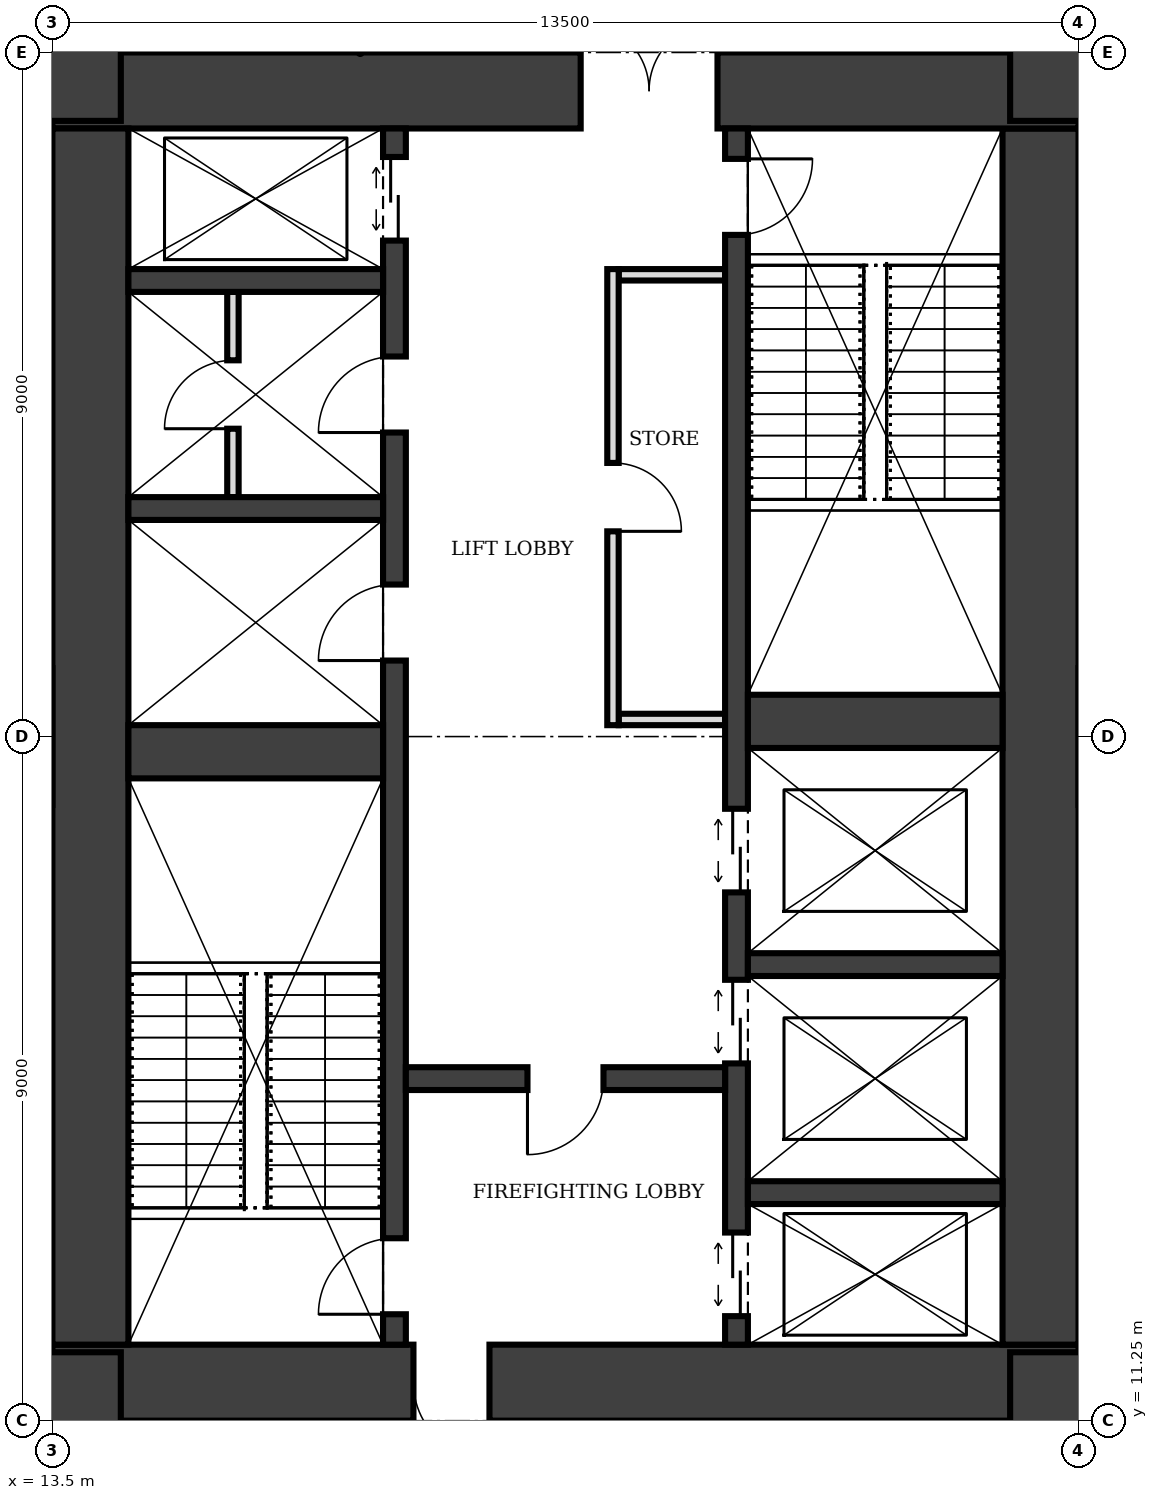
"""IFC4 building model, lengths in metres.
Left out: names, types, materials, properties, quantities, classifications, styles, units other than length and angle.
Written with IfcOpenShell. Run it as: python <this file> out.ifc"""

import sys

from ifc_helpers import new_model, si_unit, direction, frame, frame_2d, origin, place, context, subcontext, project, spatial, rectangle, extrude, element, fill, save


model = new_model("IFC4")
c1 = context("Model", 3, precision=1e-05, world=origin(), true_north=direction((0.0, 1.0)))
c2 = subcontext(c1, "Body", "Model", "MODEL_VIEW")
j1 = project(units=[si_unit("LENGTHUNIT", "METRE"), si_unit("PLANEANGLEUNIT", "RADIAN")], contexts=[c1])
p1 = place(None, origin())
s1 = spatial("IfcSite", under=j1, at=p1, CompositionType="ELEMENT")
p2 = place(p1, origin())
s2 = spatial("IfcBuilding", under=s1, at=p2, CompositionType="ELEMENT")
p3 = place(p2, frame((0.0, 0.0, 169.0)))
s3 = spatial("IfcBuildingStorey", under=s2, at=p3, CompositionType="ELEMENT", Elevation=169.0)
p4 = place(p3, frame((13.5, 11.75, 0.0), z_axis=(0.0, 0.0, 1.0), x_axis=(1.0, 0.0, 0.0)))
e1 = element("IfcWall", 1, at=p4, inside=s3, PredefinedType="SHEAR", context=c2, shape_type="SweptSolid", body=[
    extrude(rectangle(XDim=13.5, YDim=1.0, at=frame_2d((6.75, 0.0))), origin(), (0.0, 0.0, 1.0), 8.0),
])
p5 = place(p4, frame((4.75, 0.0, 0.0)))
e2 = element("IfcOpeningElement", 2, at=p5, cuts=e1, PredefinedType="OPENING", context=c2, shape_type="SweptSolid", body=[
    extrude(rectangle(XDim=1.0, YDim=2.1, at=frame_2d((0.5, 1.05))), frame((0.0, 0.51, 0.0), z_axis=(0.0, -1.0, 0.0), x_axis=(1.0, 0.0, 0.0)), (0.0, 0.0, 1.0), 1.02),
])
p6 = place(p3, frame((26.5, 12.25, 0.0), z_axis=(0.0, 0.0, 1.0), x_axis=(0.0, 1.0, 0.0)))
e3 = element("IfcWall", 3, at=p6, inside=s3, PredefinedType="SHEAR", context=c2, shape_type="SweptSolid", body=[
    extrude(rectangle(XDim=16.0, YDim=1.0, at=frame_2d((8.0, 0.0))), origin(), (0.0, 0.0, 1.0), 8.0),
])
p7 = place(p3, frame((27.0, 28.75, 0.0), z_axis=(0.0, 0.0, 1.0), x_axis=(-1.0, 0.0, 0.0)))
e4 = element("IfcWall", 4, at=p7, inside=s3, PredefinedType="SHEAR", context=c2, shape_type="SweptSolid", body=[
    extrude(rectangle(XDim=13.5, YDim=1.0, at=frame_2d((6.75, 0.0))), origin(), (0.0, 0.0, 1.0), 8.0),
])
p8 = place(p7, frame((4.75, 0.0, 0.0)))
e5 = element("IfcOpeningElement", 5, at=p8, cuts=e4, PredefinedType="OPENING", context=c2, shape_type="SweptSolid", body=[
    extrude(rectangle(XDim=1.8, YDim=2.1, at=frame_2d((0.9, 1.05))), frame((0.0, 0.51, 0.0), z_axis=(0.0, -1.0, 0.0), x_axis=(1.0, 0.0, 0.0)), (0.0, 0.0, 1.0), 1.02),
])
p9 = place(p3, frame((14.0, 28.25, 0.0), z_axis=(0.0, 0.0, 1.0), x_axis=(0.0, -1.0, 0.0)))
e6 = element("IfcWall", 6, at=p9, inside=s3, PredefinedType="SHEAR", context=c2, shape_type="SweptSolid", body=[
    extrude(rectangle(XDim=16.0, YDim=1.0, at=frame_2d((8.0, 0.0))), origin(), (0.0, 0.0, 1.0), 8.0),
])
p10 = place(p3, frame((18.0, 12.25, 0.0), z_axis=(0.0, 0.0, 1.0), x_axis=(0.0, 1.0, 0.0)))
e7 = element("IfcWall", 7, at=p10, inside=s3, PredefinedType="SHEAR", context=c2, shape_type="SweptSolid", body=[
    extrude(rectangle(XDim=16.0, YDim=0.3, at=frame_2d((8.0, 0.0))), origin(), (0.0, 0.0, 1.0), 8.0),
])
p11 = place(p10, frame((0.4, 0.0, 0.0)))
e8 = element("IfcOpeningElement", 8, at=p11, cuts=e7, PredefinedType="OPENING", context=c2, shape_type="SweptSolid", body=[
    extrude(rectangle(XDim=1.0, YDim=2.1, at=frame_2d((0.5, 1.05))), frame((0.0, 0.16, 0.0), z_axis=(0.0, -1.0, 0.0), x_axis=(1.0, 0.0, 0.0)), (0.0, 0.0, 1.0), 0.32),
])
p12 = place(p10, frame((14.525, 0.0, 0.0)))
e9 = element("IfcOpeningElement", 9, at=p12, cuts=e7, PredefinedType="OPENING", context=c2, shape_type="SweptSolid", body=[
    extrude(rectangle(XDim=1.1, YDim=2.1, at=frame_2d((0.55, 1.05))), frame((0.0, 0.16, 0.0), z_axis=(0.0, -1.0, 0.0), x_axis=(1.0, 0.0, 0.0)), (0.0, 0.0, 1.0), 0.32),
])
p13 = place(p10, frame((9.0, 0.0, 0.0)))
e10 = element("IfcOpeningElement", 10, at=p13, cuts=e7, PredefinedType="OPENING", context=c2, shape_type="SweptSolid", body=[
    extrude(rectangle(XDim=1.0, YDim=2.1, at=frame_2d((0.5, 1.05))), frame((0.0, 0.16, 0.0), z_axis=(0.0, -1.0, 0.0), x_axis=(1.0, 0.0, 0.0)), (0.0, 0.0, 1.0), 0.32),
])
p14 = place(p10, frame((12.0, 0.0, 0.0)))
e11 = element("IfcOpeningElement", 11, at=p14, cuts=e7, PredefinedType="OPENING", context=c2, shape_type="SweptSolid", body=[
    extrude(rectangle(XDim=1.0, YDim=2.1, at=frame_2d((0.5, 1.05))), frame((0.0, 0.16, 0.0), z_axis=(0.0, -1.0, 0.0), x_axis=(1.0, 0.0, 0.0)), (0.0, 0.0, 1.0), 0.32),
])
p15 = place(p3, frame((22.5, 12.25, 0.0), z_axis=(0.0, 0.0, 1.0), x_axis=(0.0, 1.0, 0.0)))
e12 = element("IfcWall", 12, at=p15, inside=s3, PredefinedType="SHEAR", context=c2, shape_type="SweptSolid", body=[
    extrude(rectangle(XDim=16.0, YDim=0.3, at=frame_2d((8.0, 0.0))), origin(), (0.0, 0.0, 1.0), 8.0),
])
p16 = place(p15, frame((14.6, 0.0, 0.0)))
e13 = element("IfcOpeningElement", 13, at=p16, cuts=e12, PredefinedType="OPENING", context=c2, shape_type="SweptSolid", body=[
    extrude(rectangle(XDim=1.0, YDim=2.1, at=frame_2d((0.5, 1.05))), frame((0.0, 0.16, 0.0), z_axis=(0.0, -1.0, 0.0), x_axis=(1.0, 0.0, 0.0)), (0.0, 0.0, 1.0), 0.32),
])
p17 = place(p15, frame((0.375, 0.0, 0.0)))
e14 = element("IfcOpeningElement", 14, at=p17, cuts=e12, PredefinedType="OPENING", context=c2, shape_type="SweptSolid", body=[
    extrude(rectangle(XDim=1.1, YDim=2.1, at=frame_2d((0.55, 1.05))), frame((0.0, 0.16, 0.0), z_axis=(0.0, -1.0, 0.0), x_axis=(1.0, 0.0, 0.0)), (0.0, 0.0, 1.0), 0.32),
])
p18 = place(p15, frame((3.7, 0.0, 0.0)))
e15 = element("IfcOpeningElement", 15, at=p18, cuts=e12, PredefinedType="OPENING", context=c2, shape_type="SweptSolid", body=[
    extrude(rectangle(XDim=1.1, YDim=2.1, at=frame_2d((0.55, 1.05))), frame((0.0, 0.16, 0.0), z_axis=(0.0, -1.0, 0.0), x_axis=(1.0, 0.0, 0.0)), (0.0, 0.0, 1.0), 0.32),
])
p19 = place(p15, frame((5.95, 0.0, 0.0)))
e16 = element("IfcOpeningElement", 16, at=p19, cuts=e12, PredefinedType="OPENING", context=c2, shape_type="SweptSolid", body=[
    extrude(rectangle(XDim=1.1, YDim=2.1, at=frame_2d((0.55, 1.05))), frame((0.0, 0.16, 0.0), z_axis=(0.0, -1.0, 0.0), x_axis=(1.0, 0.0, 0.0)), (0.0, 0.0, 1.0), 0.32),
])
p20 = place(p3, frame((14.5, 20.05, 0.0), z_axis=(0.0, 0.0, 1.0), x_axis=(1.0, 0.0, 0.0)))
e17 = element("IfcWall", 17, at=p20, inside=s3, PredefinedType="SHEAR", context=c2, shape_type="SweptSolid", body=[
    extrude(rectangle(XDim=3.35, YDim=0.7, at=frame_2d((1.675, 0.0))), origin(), (0.0, 0.0, 1.0), 8.0),
])
p21 = place(p3, frame((18.15, 15.75, 0.0), z_axis=(0.0, 0.0, 1.0), x_axis=(1.0, 0.0, 0.0)))
e18 = element("IfcWall", 18, at=p21, inside=s3, PredefinedType="SHEAR", context=c2, shape_type="SweptSolid", body=[
    extrude(rectangle(XDim=4.2, YDim=0.3, at=frame_2d((2.1, 0.0))), origin(), (0.0, 0.0, 1.0), 8.0),
])
p22 = place(p21, frame((1.6, 0.0, 0.0)))
e19 = element("IfcOpeningElement", 19, at=p22, cuts=e18, PredefinedType="OPENING", context=c2, shape_type="SweptSolid", body=[
    extrude(rectangle(XDim=1.0, YDim=2.1, at=frame_2d((0.5, 1.05))), frame((0.0, 0.16, 0.0), z_axis=(0.0, -1.0, 0.0), x_axis=(1.0, 0.0, 0.0)), (0.0, 0.0, 1.0), 0.32),
])
for number, where, z_axis, x_axis in (
    (20, (22.65, 14.25, 0.0), (0.0, 0.0, 1.0), (1.0, 0.0, 0.0)),
    (21, (22.65, 17.25, 0.0), (0.0, 0.0, 1.0), (1.0, 0.0, 0.0)),
):
    element("IfcWall", number, at=place(p3, frame(where, z_axis=z_axis, x_axis=x_axis)), inside=s3, PredefinedType="SHEAR", context=c2, shape_type="SweptSolid", body=[
        extrude(rectangle(XDim=3.35, YDim=0.3, at=frame_2d((1.675, 0.0))), origin(), (0.0, 0.0, 1.0), 8.0),
    ])
p23 = place(p3, frame((22.65, 20.45, 0.0), z_axis=(0.0, 0.0, 1.0), x_axis=(1.0, 0.0, 0.0)))
e22 = element("IfcWall", 22, at=p23, inside=s3, PredefinedType="SHEAR", context=c2, shape_type="SweptSolid", body=[
    extrude(rectangle(XDim=3.35, YDim=0.7, at=frame_2d((1.675, 0.0))), origin(), (0.0, 0.0, 1.0), 8.0),
])
for number, where, z_axis, x_axis in (
    (23, (14.5, 23.25, 0.0), (0.0, 0.0, 1.0), (1.0, 0.0, 0.0)),
    (24, (14.5, 26.25, 0.0), (0.0, 0.0, 1.0), (1.0, 0.0, 0.0)),
):
    element("IfcWall", number, at=place(p3, frame(where, z_axis=z_axis, x_axis=x_axis)), inside=s3, PredefinedType="SHEAR", context=c2, shape_type="SweptSolid", body=[
        extrude(rectangle(XDim=3.35, YDim=0.3, at=frame_2d((1.675, 0.0))), origin(), (0.0, 0.0, 1.0), 8.0),
    ])
p24 = place(p3, frame((13.5, 4.5, 0.0), z_axis=(0.0, 0.0, 1.0), x_axis=(0.0, 1.0, 0.0)))
e25 = element("IfcWall", 25, at=p24, inside=s3, PredefinedType="SHEAR", context=c2, shape_type="SweptSolid", body=[
    extrude(rectangle(XDim=7.65, YDim=1.8, at=frame_2d((3.825, 0.0))), origin(), (0.0, 0.0, 1.0), 8.0),
])
p25 = place(p24, frame((2.775, 0.0, 0.0)))
e26 = element("IfcOpeningElement", 26, at=p25, cuts=e25, PredefinedType="OPENING", context=c2, shape_type="SweptSolid", body=[
    extrude(rectangle(XDim=1.2, YDim=2.1, at=frame_2d((0.6, 1.05))), frame((0.0, 0.91, 0.0), z_axis=(0.0, -1.0, 0.0), x_axis=(1.0, 0.0, 0.0)), (0.0, 0.0, 1.0), 1.82),
])
p26 = place(p3, frame((27.0, 4.5, 0.0), z_axis=(0.0, 0.0, 1.0), x_axis=(0.0, 1.0, 0.0)))
e27 = element("IfcWall", 27, at=p26, inside=s3, PredefinedType="SHEAR", context=c2, shape_type="SweptSolid", body=[
    extrude(rectangle(XDim=7.65, YDim=1.8, at=frame_2d((3.825, 0.0))), origin(), (0.0, 0.0, 1.0), 8.0),
])
p27 = place(p26, frame((2.775, 0.0, 0.0)))
e28 = element("IfcOpeningElement", 28, at=p27, cuts=e27, PredefinedType="OPENING", context=c2, shape_type="SweptSolid", body=[
    extrude(rectangle(XDim=1.2, YDim=2.1, at=frame_2d((0.6, 1.05))), frame((0.0, 0.91, 0.0), z_axis=(0.0, -1.0, 0.0), x_axis=(1.0, 0.0, 0.0)), (0.0, 0.0, 1.0), 1.82),
])
p28 = place(p3, frame((13.5, 28.35, 0.0), z_axis=(0.0, 0.0, 1.0), x_axis=(0.0, 1.0, 0.0)))
e29 = element("IfcWall", 29, at=p28, inside=s3, PredefinedType="SHEAR", context=c2, shape_type="SweptSolid", body=[
    extrude(rectangle(XDim=7.65, YDim=1.8, at=frame_2d((3.825, 0.0))), origin(), (0.0, 0.0, 1.0), 8.0),
])
p29 = place(p28, frame((3.675, 0.0, 0.0)))
e30 = element("IfcOpeningElement", 30, at=p29, cuts=e29, PredefinedType="OPENING", context=c2, shape_type="SweptSolid", body=[
    extrude(rectangle(XDim=1.2, YDim=2.1, at=frame_2d((0.6, 1.05))), frame((0.0, 0.91, 0.0), z_axis=(0.0, -1.0, 0.0), x_axis=(1.0, 0.0, 0.0)), (0.0, 0.0, 1.0), 1.82),
])
p30 = place(p3, frame((27.0, 28.35, 0.0), z_axis=(0.0, 0.0, 1.0), x_axis=(0.0, 1.0, 0.0)))
e31 = element("IfcWall", 31, at=p30, inside=s3, PredefinedType="SHEAR", context=c2, shape_type="SweptSolid", body=[
    extrude(rectangle(XDim=7.65, YDim=1.8, at=frame_2d((3.825, 0.0))), origin(), (0.0, 0.0, 1.0), 8.0),
])
p31 = place(p30, frame((3.675, 0.0, 0.0)))
e32 = element("IfcOpeningElement", 32, at=p31, cuts=e31, PredefinedType="OPENING", context=c2, shape_type="SweptSolid", body=[
    extrude(rectangle(XDim=1.2, YDim=2.1, at=frame_2d((0.6, 1.05))), frame((0.0, 0.91, 0.0), z_axis=(0.0, -1.0, 0.0), x_axis=(1.0, 0.0, 0.0)), (0.0, 0.0, 1.0), 1.82),
])
p32 = place(p3, frame((20.875, 20.4, 0.0), z_axis=(0.0, 0.0, 1.0), x_axis=(0.0, 1.0, 0.0)))
e33 = element("IfcWall", 33, at=p32, inside=s3, PredefinedType="PARTITIONING", context=c2, shape_type="SweptSolid", body=[
    extrude(rectangle(XDim=6.0, YDim=0.15, at=frame_2d((3.0, 0.0))), origin(), (0.0, 0.0, 1.0), 7.75),
])
p33 = place(p32, frame((2.55, 0.0, 0.0)))
e34 = element("IfcOpeningElement", 34, at=p33, cuts=e33, PredefinedType="OPENING", context=c2, shape_type="SweptSolid", body=[
    extrude(rectangle(XDim=0.9, YDim=2.1, at=frame_2d((0.45, 1.05))), frame((0.0, 0.085, 0.0), z_axis=(0.0, -1.0, 0.0), x_axis=(1.0, 0.0, 0.0)), (0.0, 0.0, 1.0), 0.17),
])
for number, where, z_axis, x_axis in (
    (35, (20.95, 20.475, 0.0), (0.0, 0.0, 1.0), (1.0, 0.0, 0.0)),
    (36, (20.95, 26.325, 0.0), (0.0, 0.0, 1.0), (1.0, 0.0, 0.0)),
):
    element("IfcWall", number, at=place(p3, frame(where, z_axis=z_axis, x_axis=x_axis)), inside=s3, PredefinedType="PARTITIONING", context=c2, shape_type="SweptSolid", body=[
        extrude(rectangle(XDim=1.4, YDim=0.15, at=frame_2d((0.7, 0.0))), origin(), (0.0, 0.0, 1.0), 7.75),
    ])
p34 = place(p3, frame((15.875, 23.4, 0.0), z_axis=(0.0, 0.0, 1.0), x_axis=(0.0, 1.0, 0.0)))
e37 = element("IfcWall", 37, at=p34, inside=s3, PredefinedType="PARTITIONING", context=c2, shape_type="SweptSolid", body=[
    extrude(rectangle(XDim=2.7, YDim=0.15, at=frame_2d((1.35, 0.0))), origin(), (0.0, 0.0, 1.0), 7.75),
])
p35 = place(p34, frame((0.9, 0.0, 0.0)))
e38 = element("IfcOpeningElement", 38, at=p35, cuts=e37, PredefinedType="OPENING", context=c2, shape_type="SweptSolid", body=[
    extrude(rectangle(XDim=0.9, YDim=2.1, at=frame_2d((0.45, 1.05))), frame((0.0, 0.085, 0.0), z_axis=(0.0, -1.0, 0.0), x_axis=(1.0, 0.0, 0.0)), (0.0, 0.0, 1.0), 0.17),
])
p36 = place(p5, frame((1.0, 0.0, 0.0), z_axis=(0.0, 0.0, 1.0), x_axis=(-1.0, 0.0, 0.0)))
e39 = element("IfcDoor", 39, at=p36, inside=s3, OperationType="SINGLE_SWING_LEFT", PredefinedType="DOOR", context=c2, shape_type="SweptSolid", body=[
    extrude(rectangle(XDim=1.0, YDim=2.1, at=frame_2d((0.5, 1.05))), frame((0.0, 0.025, 0.0), z_axis=(0.0, -1.0, 0.0), x_axis=(1.0, 0.0, 0.0)), (0.0, 0.0, 1.0), 0.05),
])
fill(e2, e39)
p37 = place(p8, frame((1.8, 0.0, 0.0), z_axis=(0.0, 0.0, 1.0), x_axis=(-1.0, 0.0, 0.0)))
e40 = element("IfcDoor", 40, at=p37, inside=s3, OperationType="DOUBLE_DOOR_SINGLE_SWING", PredefinedType="DOOR", context=c2, shape_type="SweptSolid", body=[
    extrude(rectangle(XDim=1.8, YDim=2.1, at=frame_2d((0.9, 1.05))), frame((0.0, 0.025, 0.0), z_axis=(0.0, -1.0, 0.0), x_axis=(1.0, 0.0, 0.0)), (0.0, 0.0, 1.0), 0.05),
])
fill(e5, e40)
p38 = place(p22, frame((1.0, 0.0, 0.0), z_axis=(0.0, 0.0, 1.0), x_axis=(-1.0, 0.0, 0.0)))
e41 = element("IfcDoor", 41, at=p38, inside=s3, OperationType="SINGLE_SWING_RIGHT", PredefinedType="DOOR", context=c2, shape_type="SweptSolid", body=[
    extrude(rectangle(XDim=1.0, YDim=2.1, at=frame_2d((0.5, 1.05))), frame((0.0, 0.025, 0.0), z_axis=(0.0, -1.0, 0.0), x_axis=(1.0, 0.0, 0.0)), (0.0, 0.0, 1.0), 0.05),
])
fill(e19, e41)
p39 = place(p11, origin())
e42 = element("IfcDoor", 42, at=p39, inside=s3, OperationType="SINGLE_SWING_LEFT", PredefinedType="DOOR", context=c2, shape_type="SweptSolid", body=[
    extrude(rectangle(XDim=1.0, YDim=2.1, at=frame_2d((0.5, 1.05))), frame((0.0, 0.025, 0.0), z_axis=(0.0, -1.0, 0.0), x_axis=(1.0, 0.0, 0.0)), (0.0, 0.0, 1.0), 0.05),
])
fill(e8, e42)
p40 = place(p16, frame((1.0, 0.0, 0.0), z_axis=(0.0, 0.0, 1.0), x_axis=(-1.0, 0.0, 0.0)))
e43 = element("IfcDoor", 43, at=p40, inside=s3, OperationType="SINGLE_SWING_LEFT", PredefinedType="DOOR", context=c2, shape_type="SweptSolid", body=[
    extrude(rectangle(XDim=1.0, YDim=2.1, at=frame_2d((0.5, 1.05))), frame((0.0, 0.025, 0.0), z_axis=(0.0, -1.0, 0.0), x_axis=(1.0, 0.0, 0.0)), (0.0, 0.0, 1.0), 0.05),
])
fill(e13, e43)
p41 = place(p17, origin())
e44 = element("IfcDoor", 44, at=p41, inside=s3, OperationType="DOUBLE_DOOR_SLIDING", PredefinedType="DOOR", context=c2, shape_type="SweptSolid", body=[
    extrude(rectangle(XDim=1.1, YDim=2.1, at=frame_2d((0.55, 1.05))), frame((0.0, 0.025, 0.0), z_axis=(0.0, -1.0, 0.0), x_axis=(1.0, 0.0, 0.0)), (0.0, 0.0, 1.0), 0.05),
])
fill(e14, e44)
p42 = place(p12, origin())
e45 = element("IfcDoor", 45, at=p42, inside=s3, OperationType="DOUBLE_DOOR_SLIDING", PredefinedType="DOOR", context=c2, shape_type="SweptSolid", body=[
    extrude(rectangle(XDim=1.1, YDim=2.1, at=frame_2d((0.55, 1.05))), frame((0.0, 0.025, 0.0), z_axis=(0.0, -1.0, 0.0), x_axis=(1.0, 0.0, 0.0)), (0.0, 0.0, 1.0), 0.05),
])
fill(e9, e45)
p43 = place(p18, origin())
e46 = element("IfcDoor", 46, at=p43, inside=s3, OperationType="DOUBLE_DOOR_SLIDING", PredefinedType="DOOR", context=c2, shape_type="SweptSolid", body=[
    extrude(rectangle(XDim=1.1, YDim=2.1, at=frame_2d((0.55, 1.05))), frame((0.0, 0.025, 0.0), z_axis=(0.0, -1.0, 0.0), x_axis=(1.0, 0.0, 0.0)), (0.0, 0.0, 1.0), 0.05),
])
fill(e15, e46)
p44 = place(p19, origin())
e47 = element("IfcDoor", 47, at=p44, inside=s3, OperationType="DOUBLE_DOOR_SLIDING", PredefinedType="DOOR", context=c2, shape_type="SweptSolid", body=[
    extrude(rectangle(XDim=1.1, YDim=2.1, at=frame_2d((0.55, 1.05))), frame((0.0, 0.025, 0.0), z_axis=(0.0, -1.0, 0.0), x_axis=(1.0, 0.0, 0.0)), (0.0, 0.0, 1.0), 0.05),
])
fill(e16, e47)
p45 = place(p33, frame((0.9, 0.0, 0.0), z_axis=(0.0, 0.0, 1.0), x_axis=(-1.0, 0.0, 0.0)))
e48 = element("IfcDoor", 48, at=p45, inside=s3, OperationType="SINGLE_SWING_RIGHT", PredefinedType="DOOR", context=c2, shape_type="SweptSolid", body=[
    extrude(rectangle(XDim=0.9, YDim=2.1, at=frame_2d((0.45, 1.05))), frame((0.0, 0.025, 0.0), z_axis=(0.0, -1.0, 0.0), x_axis=(1.0, 0.0, 0.0)), (0.0, 0.0, 1.0), 0.05),
])
fill(e34, e48)
p46 = place(p13, origin())
e49 = element("IfcDoor", 49, at=p46, inside=s3, OperationType="SINGLE_SWING_LEFT", PredefinedType="DOOR", context=c2, shape_type="SweptSolid", body=[
    extrude(rectangle(XDim=1.0, YDim=2.1, at=frame_2d((0.5, 1.05))), frame((0.0, 0.025, 0.0), z_axis=(0.0, -1.0, 0.0), x_axis=(1.0, 0.0, 0.0)), (0.0, 0.0, 1.0), 0.05),
])
fill(e10, e49)
p47 = place(p14, origin())
e50 = element("IfcDoor", 50, at=p47, inside=s3, OperationType="SINGLE_SWING_LEFT", PredefinedType="DOOR", context=c2, shape_type="SweptSolid", body=[
    extrude(rectangle(XDim=1.0, YDim=2.1, at=frame_2d((0.5, 1.05))), frame((0.0, 0.025, 0.0), z_axis=(0.0, -1.0, 0.0), x_axis=(1.0, 0.0, 0.0)), (0.0, 0.0, 1.0), 0.05),
])
fill(e11, e50)
p48 = place(p35, origin())
e51 = element("IfcDoor", 51, at=p48, inside=s3, OperationType="SINGLE_SWING_LEFT", PredefinedType="DOOR", context=c2, shape_type="SweptSolid", body=[
    extrude(rectangle(XDim=0.9, YDim=2.1, at=frame_2d((0.45, 1.05))), frame((0.0, 0.025, 0.0), z_axis=(0.0, -1.0, 0.0), x_axis=(1.0, 0.0, 0.0)), (0.0, 0.0, 1.0), 0.05),
])
fill(e38, e51)
save(model, sys.argv[1])
